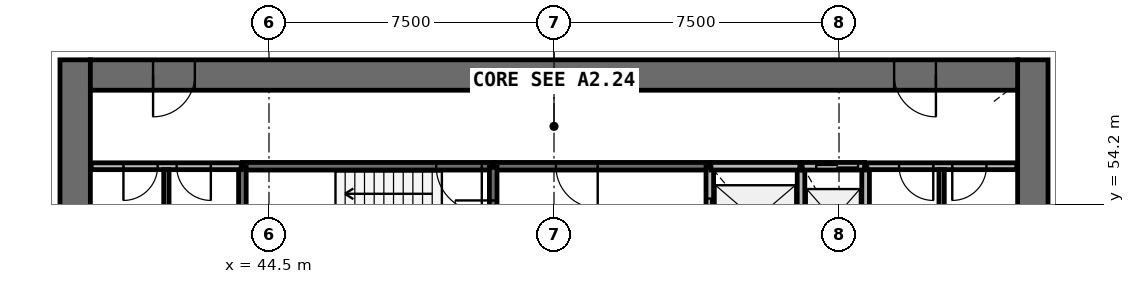
"""IFC4 building model, lengths in metres.
Left out: names, types, materials, properties, quantities, classifications, styles, units other than length and angle.
Written with IfcOpenShell. Run it as: python <this file> out.ifc"""

import sys

from ifc_helpers import new_model, si_unit, direction, frame, frame_2d, origin, place, context, subcontext, project, spatial, rectangle, extrude, source, transform, mapped, element, fill, save


model = new_model("IFC4")
c1 = context("Model", 3, precision=1e-05, world=origin(), true_north=direction((0.0, 1.0)))
c2 = subcontext(c1, "Body", "Model", "MODEL_VIEW")
j1 = project(units=[si_unit("LENGTHUNIT", "METRE"), si_unit("PLANEANGLEUNIT", "RADIAN")], contexts=[c1])
p1 = place(None, origin())
s1 = spatial("IfcSite", under=j1, at=p1, CompositionType="ELEMENT")
p2 = place(p1, origin())
s2 = spatial("IfcBuilding", under=s1, at=p2, CompositionType="ELEMENT")
p3 = place(p2, frame((0.0, 0.0, 100.3)))
s3 = spatial("IfcBuildingStorey", under=s2, at=p3, CompositionType="ELEMENT", Elevation=100.3)
p4 = place(p3, frame((64.6, 38.0, 0.0), z_axis=(0.0, 0.0, 1.0), x_axis=(0.0, 1.0, 0.0)))
e1 = element("IfcWall", 1, at=p4, inside=s3, PredefinedType="SHEAR", context=c2, shape_type="SweptSolid", body=[
    extrude(rectangle(XDim=20.0, YDim=0.8, at=frame_2d((10.0, 0.0))), origin(), (0.0, 0.0, 1.0), 4.1),
])
p5 = place(p4, frame((9.1, 0.0, 0.0)))
e2 = element("IfcOpeningElement", 2, at=p5, cuts=e1, PredefinedType="OPENING", context=c2, shape_type="SweptSolid", body=[
    extrude(rectangle(XDim=1.8, YDim=2.1, at=frame_2d((0.9, 1.05))), frame((0.0, 0.41, 0.0), z_axis=(0.0, -1.0, 0.0), x_axis=(1.0, 0.0, 0.0)), (0.0, 0.0, 1.0), 0.82),
])
p6 = place(p3, frame((39.4, 58.0, 0.0), z_axis=(0.0, 0.0, 1.0), x_axis=(0.0, -1.0, 0.0)))
e3 = element("IfcWall", 3, at=p6, inside=s3, PredefinedType="SHEAR", context=c2, shape_type="SweptSolid", body=[
    extrude(rectangle(XDim=20.0, YDim=0.8, at=frame_2d((10.0, 0.0))), origin(), (0.0, 0.0, 1.0), 4.1),
])
p7 = place(p6, frame((9.1, 0.0, 0.0)))
e4 = element("IfcOpeningElement", 4, at=p7, cuts=e3, PredefinedType="OPENING", context=c2, shape_type="SweptSolid", body=[
    extrude(rectangle(XDim=1.8, YDim=2.1, at=frame_2d((0.9, 1.05))), frame((0.0, 0.41, 0.0), z_axis=(0.0, -1.0, 0.0), x_axis=(1.0, 0.0, 0.0)), (0.0, 0.0, 1.0), 0.82),
])
p8 = place(p3, frame((64.2, 57.6, 0.0), z_axis=(0.0, 0.0, 1.0), x_axis=(-1.0, 0.0, 0.0)))
e5 = element("IfcWall", 5, at=p8, inside=s3, PredefinedType="SHEAR", context=c2, shape_type="SweptSolid", body=[
    extrude(rectangle(XDim=24.4, YDim=0.8, at=frame_2d((12.2, 0.0))), origin(), (0.0, 0.0, 1.0), 4.1),
])
p9 = place(p8, frame((21.65, 0.0, 0.0)))
e6 = element("IfcOpeningElement", 6, at=p9, cuts=e5, PredefinedType="OPENING", context=c2, shape_type="SweptSolid", body=[
    extrude(rectangle(XDim=1.1, YDim=2.1, at=frame_2d((0.55, 1.05))), frame((0.0, 0.41, 0.0), z_axis=(0.0, -1.0, 0.0), x_axis=(1.0, 0.0, 0.0)), (0.0, 0.0, 1.0), 0.82),
])
p10 = place(p8, frame((2.15, 0.0, 0.0)))
e7 = element("IfcOpeningElement", 7, at=p10, cuts=e5, PredefinedType="OPENING", context=c2, shape_type="SweptSolid", body=[
    extrude(rectangle(XDim=1.1, YDim=2.1, at=frame_2d((0.55, 1.05))), frame((0.0, 0.41, 0.0), z_axis=(0.0, -1.0, 0.0), x_axis=(1.0, 0.0, 0.0)), (0.0, 0.0, 1.0), 0.82),
])
p11 = place(p3, frame((50.4, 55.2, 0.0), z_axis=(0.0, 0.0, 1.0), x_axis=(-1.0, 0.0, 0.0)))
e8 = element("IfcWall", 8, at=p11, inside=s3, PredefinedType="SOLIDWALL", context=c2, shape_type="SweptSolid", body=[
    extrude(rectangle(XDim=6.6, YDim=0.2, at=frame_2d((3.3, 0.0))), origin(), (0.0, 0.0, 1.0), 3.7),
])
p12 = place(p11, frame((0.3, 0.0, 0.0)))
e9 = element("IfcOpeningElement", 9, at=p12, cuts=e8, PredefinedType="OPENING", context=c2, shape_type="SweptSolid", body=[
    extrude(rectangle(XDim=1.2, YDim=2.1, at=frame_2d((0.6, 1.05))), frame((0.0, 0.11, 0.0), z_axis=(0.0, -1.0, 0.0), x_axis=(1.0, 0.0, 0.0)), (0.0, 0.0, 1.0), 0.22),
])
p13 = place(p3, frame((56.1, 55.2, 0.0), z_axis=(0.0, 0.0, 1.0), x_axis=(-1.0, 0.0, 0.0)))
e10 = element("IfcWall", 10, at=p13, inside=s3, PredefinedType="SOLIDWALL", context=c2, shape_type="SweptSolid", body=[
    extrude(rectangle(XDim=5.67, YDim=0.2, at=frame_2d((2.835, 0.0))), origin(), (0.0, 0.0, 1.0), 3.7),
])
p14 = place(p13, frame((2.95, 0.0, 0.0)))
e11 = element("IfcOpeningElement", 11, at=p14, cuts=e10, PredefinedType="OPENING", context=c2, shape_type="SweptSolid", body=[
    extrude(rectangle(XDim=1.1, YDim=2.1, at=frame_2d((0.55, 1.05))), frame((0.0, 0.11, 0.0), z_axis=(0.0, -1.0, 0.0), x_axis=(1.0, 0.0, 0.0)), (0.0, 0.0, 1.0), 0.22),
])
p15 = place(p3, frame((50.4, 52.4, 0.0), z_axis=(0.0, 0.0, 1.0), x_axis=(0.0, 1.0, 0.0)))
e12 = element("IfcWall", 12, at=p15, inside=s3, PredefinedType="SOLIDWALL", context=c2, shape_type="SweptSolid", body=[
    extrude(rectangle(XDim=2.77, YDim=0.2, at=frame_2d((1.385, 0.0))), origin(), (0.0, 0.0, 1.0), 3.7),
])
p16 = place(p15, frame((0.9, 0.0, 0.0)))
e13 = element("IfcOpeningElement", 13, at=p16, cuts=e12, PredefinedType="OPENING", context=c2, shape_type="SweptSolid", body=[
    extrude(rectangle(XDim=1.0, YDim=2.1, at=frame_2d((0.5, 1.05))), frame((0.0, 0.11, 0.0), z_axis=(0.0, -1.0, 0.0), x_axis=(1.0, 0.0, 0.0)), (0.0, 0.0, 1.0), 0.22),
])
p17 = place(p3, frame((56.1, 55.17, 0.0), z_axis=(0.0, 0.0, 1.0), x_axis=(0.0, -1.0, 0.0)))
e14 = element("IfcWall", 14, at=p17, inside=s3, PredefinedType="SOLIDWALL", context=c2, shape_type="SweptSolid", body=[
    extrude(rectangle(XDim=2.77, YDim=0.2, at=frame_2d((1.385, 0.0))), origin(), (0.0, 0.0, 1.0), 3.7),
])
p18 = place(p17, frame((0.82, 0.0, 0.0)))
e15 = element("IfcOpeningElement", 15, at=p18, cuts=e14, PredefinedType="OPENING", context=c2, shape_type="SweptSolid", body=[
    extrude(rectangle(XDim=1.1, YDim=2.1, at=frame_2d((0.55, 1.05))), frame((0.0, 0.11, 0.0), z_axis=(0.0, -1.0, 0.0), x_axis=(1.0, 0.0, 0.0)), (0.0, 0.0, 1.0), 0.22),
])
for number, where, z_axis, x_axis in (
    (16, (58.5, 52.4, 0.0), (0.0, 0.0, 1.0), (0.0, 1.0, 0.0)),
    (17, (60.2, 52.4, 0.0), (0.0, 0.0, 1.0), (0.0, 1.0, 0.0)),
):
    element("IfcWall", number, at=place(p3, frame(where, z_axis=z_axis, x_axis=x_axis)), inside=s3, PredefinedType="SOLIDWALL", context=c2, shape_type="SweptSolid", body=[
        extrude(rectangle(XDim=2.8, YDim=0.2, at=frame_2d((1.4, 0.0))), origin(), (0.0, 0.0, 1.0), 3.7),
    ])
p19 = place(p3, frame((58.47, 55.2, 0.0), z_axis=(0.0, 0.0, 1.0), x_axis=(-1.0, 0.0, 0.0)))
e18 = element("IfcWall", 18, at=p19, inside=s3, PredefinedType="SOLIDWALL", context=c2, shape_type="SweptSolid", body=[
    extrude(rectangle(XDim=2.34, YDim=0.2, at=frame_2d((1.17, 0.0))), origin(), (0.0, 0.0, 1.0), 3.7),
])
p20 = place(p3, frame((43.8, 55.17, 0.0), z_axis=(0.0, 0.0, 1.0), x_axis=(0.0, -1.0, 0.0)))
e19 = element("IfcWall", 19, at=p20, inside=s3, PredefinedType="SOLIDWALL", context=c2, shape_type="SweptSolid", body=[
    extrude(rectangle(XDim=2.14, YDim=0.2, at=frame_2d((1.07, 0.0))), origin(), (0.0, 0.0, 1.0), 3.7),
])
p21 = place(p3, frame((60.17, 55.2, 0.0), z_axis=(0.0, 0.0, 1.0), x_axis=(-1.0, 0.0, 0.0)))
e20 = element("IfcWall", 20, at=p21, inside=s3, PredefinedType="SOLIDWALL", context=c2, shape_type="SweptSolid", body=[
    extrude(rectangle(XDim=1.64, YDim=0.2, at=frame_2d((0.82, 0.0))), origin(), (0.0, 0.0, 1.0), 3.7),
])
p22 = place(p21, frame((0.17, 0.0, 0.0)))
e21 = element("IfcOpeningElement", 21, at=p22, cuts=e20, PredefinedType="OPENING", context=c2, shape_type="SweptSolid", body=[
    extrude(rectangle(XDim=1.1, YDim=2.1, at=frame_2d((0.55, 1.05))), frame((0.0, 0.11, 0.0), z_axis=(0.0, -1.0, 0.0), x_axis=(1.0, 0.0, 0.0)), (0.0, 0.0, 1.0), 0.22),
])
p23 = place(p3, frame((64.18, 55.2, 0.0), z_axis=(0.0, 0.0, 1.0), x_axis=(-1.0, 0.0, 0.0)))
e22 = element("IfcWall", 22, at=p23, inside=s3, PredefinedType="PARTITIONING", context=c2, shape_type="SweptSolid", body=[
    extrude(rectangle(XDim=3.95, YDim=0.18, at=frame_2d((1.975, 0.0))), origin(), (0.0, 0.0, 1.0), 3.7),
])
p24 = place(p23, frame((2.2, 0.0, 0.0)))
e23 = element("IfcOpeningElement", 23, at=p24, cuts=e22, PredefinedType="OPENING", context=c2, shape_type="SweptSolid", body=[
    extrude(rectangle(XDim=0.9, YDim=2.1, at=frame_2d((0.45, 1.05))), frame((0.0, 0.1, 0.0), z_axis=(0.0, -1.0, 0.0), x_axis=(1.0, 0.0, 0.0)), (0.0, 0.0, 1.0), 0.2),
])
p25 = place(p23, frame((0.8, 0.0, 0.0)))
e24 = element("IfcOpeningElement", 24, at=p25, cuts=e22, PredefinedType="OPENING", context=c2, shape_type="SweptSolid", body=[
    extrude(rectangle(XDim=0.9, YDim=2.1, at=frame_2d((0.45, 1.05))), frame((0.0, 0.1, 0.0), z_axis=(0.0, -1.0, 0.0), x_axis=(1.0, 0.0, 0.0)), (0.0, 0.0, 1.0), 0.2),
])
p26 = place(p3, frame((43.77, 55.2, 0.0), z_axis=(0.0, 0.0, 1.0), x_axis=(-1.0, 0.0, 0.0)))
e25 = element("IfcWall", 25, at=p26, inside=s3, PredefinedType="PARTITIONING", context=c2, shape_type="SweptSolid", body=[
    extrude(rectangle(XDim=3.95, YDim=0.18, at=frame_2d((1.975, 0.0))), origin(), (0.0, 0.0, 1.0), 3.7),
])
p27 = place(p26, frame((2.2, 0.0, 0.0)))
e26 = element("IfcOpeningElement", 26, at=p27, cuts=e25, PredefinedType="OPENING", context=c2, shape_type="SweptSolid", body=[
    extrude(rectangle(XDim=0.9, YDim=2.1, at=frame_2d((0.45, 1.05))), frame((0.0, 0.1, 0.0), z_axis=(0.0, -1.0, 0.0), x_axis=(1.0, 0.0, 0.0)), (0.0, 0.0, 1.0), 0.2),
])
p28 = place(p26, frame((0.8, 0.0, 0.0)))
e27 = element("IfcOpeningElement", 27, at=p28, cuts=e25, PredefinedType="OPENING", context=c2, shape_type="SweptSolid", body=[
    extrude(rectangle(XDim=0.9, YDim=2.1, at=frame_2d((0.45, 1.05))), frame((0.0, 0.1, 0.0), z_axis=(0.0, -1.0, 0.0), x_axis=(1.0, 0.0, 0.0)), (0.0, 0.0, 1.0), 0.2),
])
p29 = place(p3, frame((62.2, 52.4, 0.0), z_axis=(0.0, 0.0, 1.0), x_axis=(0.0, 1.0, 0.0)))
e28 = element("IfcWall", 28, at=p29, inside=s3, PredefinedType="PARTITIONING", context=c2, shape_type="SweptSolid", body=[
    extrude(rectangle(XDim=2.71, YDim=0.14, at=frame_2d((1.355, 0.0))), origin(), (0.0, 0.0, 1.0), 2.9),
])
p30 = place(p3, frame((41.8, 53.1, 0.0), z_axis=(0.0, 0.0, 1.0), x_axis=(0.0, 1.0, 0.0)))
e29 = element("IfcWall", 29, at=p30, inside=s3, PredefinedType="PARTITIONING", context=c2, shape_type="SweptSolid", body=[
    extrude(rectangle(XDim=2.01, YDim=0.14, at=frame_2d((1.005, 0.0))), origin(), (0.0, 0.0, 1.0), 2.9),
])
m1 = source(origin(), c2, "Body", "SweptSolid", [
    extrude(rectangle(XDim=1.1, YDim=2.1, at=frame_2d((0.55, 1.05))), frame((0.0, 0.025, 0.0), z_axis=(0.0, -1.0, 0.0), x_axis=(1.0, 0.0, 0.0)), (0.0, 0.0, 1.0), 0.05),
])
p31 = place(p18, origin())
e30 = element("IfcDoor", 30, at=p31, inside=s3, OperationType="DOUBLE_DOOR_SLIDING", PredefinedType="USERDEFINED", context=c2, shape_type="MappedRepresentation", body=[
    mapped(m1, transform((0.0, 0.0, 0.0), scale=1.0)),
])
fill(e15, e30)
p32 = place(p22, origin())
e31 = element("IfcDoor", 31, at=p32, inside=s3, OperationType="DOUBLE_DOOR_SLIDING", PredefinedType="USERDEFINED", context=c2, shape_type="MappedRepresentation", body=[
    mapped(m1, transform((0.0, 0.0, 0.0), scale=1.0)),
])
fill(e21, e31)
m2 = source(origin(), c2, "Body", "SweptSolid", [
    extrude(rectangle(XDim=1.2, YDim=2.1, at=frame_2d((0.6, 1.05))), frame((0.0, 0.025, 0.0), z_axis=(0.0, -1.0, 0.0), x_axis=(1.0, 0.0, 0.0)), (0.0, 0.0, 1.0), 0.05),
])
p33 = place(p12, origin())
e32 = element("IfcDoor", 32, at=p33, inside=s3, OperationType="SINGLE_SWING_LEFT", PredefinedType="DOOR", context=c2, shape_type="MappedRepresentation", body=[
    mapped(m2, transform((0.0, 0.0, 0.0), scale=1.0)),
])
fill(e9, e32)
m3 = source(origin(), c2, "Body", "SweptSolid", [
    extrude(rectangle(XDim=1.0, YDim=2.1, at=frame_2d((0.5, 1.05))), frame((0.0, 0.025, 0.0), z_axis=(0.0, -1.0, 0.0), x_axis=(1.0, 0.0, 0.0)), (0.0, 0.0, 1.0), 0.05),
])
p34 = place(p16, origin())
e33 = element("IfcDoor", 33, at=p34, inside=s3, OperationType="SINGLE_SWING_RIGHT", PredefinedType="DOOR", context=c2, shape_type="MappedRepresentation", body=[
    mapped(m3, transform((0.0, 0.0, 0.0), scale=1.0)),
])
fill(e13, e33)
m4 = source(origin(), c2, "Body", "SweptSolid", [
    extrude(rectangle(XDim=1.1, YDim=2.1, at=frame_2d((0.55, 1.05))), frame((0.0, 0.025, 0.0), z_axis=(0.0, -1.0, 0.0), x_axis=(1.0, 0.0, 0.0)), (0.0, 0.0, 1.0), 0.05),
])
p35 = place(p14, origin())
e34 = element("IfcDoor", 34, at=p35, inside=s3, OperationType="SINGLE_SWING_LEFT", PredefinedType="DOOR", context=c2, shape_type="MappedRepresentation", body=[
    mapped(m4, transform((0.0, 0.0, 0.0), scale=1.0)),
])
fill(e11, e34)
m5 = source(origin(), c2, "Body", "SweptSolid", [
    extrude(rectangle(XDim=1.1, YDim=2.1, at=frame_2d((0.55, 1.05))), frame((0.0, 0.025, 0.0), z_axis=(0.0, -1.0, 0.0), x_axis=(1.0, 0.0, 0.0)), (0.0, 0.0, 1.0), 0.05),
])
p36 = place(p9, origin())
e35 = element("IfcDoor", 35, at=p36, inside=s3, OperationType="SINGLE_SWING_RIGHT", PredefinedType="DOOR", context=c2, shape_type="MappedRepresentation", body=[
    mapped(m5, transform((0.0, 0.0, 0.0), scale=1.0)),
])
fill(e6, e35)
p37 = place(p10, origin())
e36 = element("IfcDoor", 36, at=p37, inside=s3, OperationType="SINGLE_SWING_LEFT", PredefinedType="DOOR", context=c2, shape_type="MappedRepresentation", body=[
    mapped(m5, transform((0.0, 0.0, 0.0), scale=1.0)),
])
fill(e7, e36)
m6 = source(origin(), c2, "Body", "SweptSolid", [
    extrude(rectangle(XDim=0.9, YDim=2.1, at=frame_2d((0.45, 1.05))), frame((0.0, 0.025, 0.0), z_axis=(0.0, -1.0, 0.0), x_axis=(1.0, 0.0, 0.0)), (0.0, 0.0, 1.0), 0.05),
])
p38 = place(p27, origin())
e37 = element("IfcDoor", 37, at=p38, inside=s3, OperationType="SINGLE_SWING_RIGHT", PredefinedType="DOOR", context=c2, shape_type="MappedRepresentation", body=[
    mapped(m6, transform((0.0, 0.0, 0.0), scale=1.0)),
])
fill(e26, e37)
p39 = place(p28, origin())
e38 = element("IfcDoor", 38, at=p39, inside=s3, OperationType="SINGLE_SWING_LEFT", PredefinedType="DOOR", context=c2, shape_type="MappedRepresentation", body=[
    mapped(m6, transform((0.0, 0.0, 0.0), scale=1.0)),
])
fill(e27, e38)
p40 = place(p24, origin())
e39 = element("IfcDoor", 39, at=p40, inside=s3, OperationType="SINGLE_SWING_LEFT", PredefinedType="DOOR", context=c2, shape_type="MappedRepresentation", body=[
    mapped(m6, transform((0.0, 0.0, 0.0), scale=1.0)),
])
fill(e23, e39)
p41 = place(p25, origin())
e40 = element("IfcDoor", 40, at=p41, inside=s3, OperationType="SINGLE_SWING_RIGHT", PredefinedType="DOOR", context=c2, shape_type="MappedRepresentation", body=[
    mapped(m6, transform((0.0, 0.0, 0.0), scale=1.0)),
])
fill(e24, e40)
save(model, sys.argv[1])
